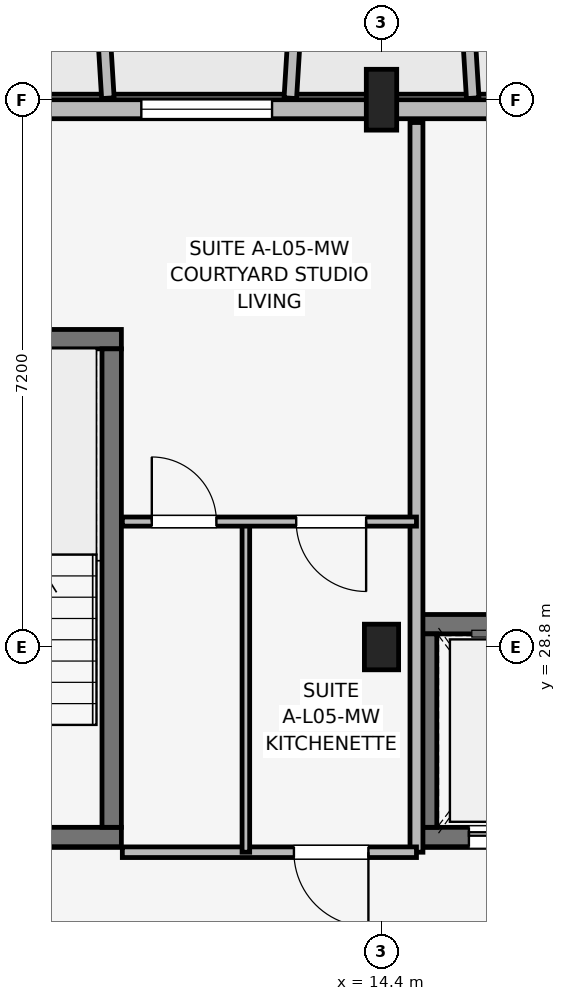
"""IFC4 building model, lengths in metres.
Left out: names, types, materials, properties, quantities, classifications, styles, units other than length and angle.
Written with IfcOpenShell. Run it as: python <this file> out.ifc"""

import sys

from ifc_helpers import new_model, si_unit, direction, frame, frame_2d, origin, origin_2d, place, context, subcontext, project, spatial, rectangle, extrude, element, fill, save


model = new_model("IFC4")
c1 = context("Model", 3, precision=1e-05, world=origin(), true_north=direction((0.0, 1.0)))
c2 = subcontext(c1, "Body", "Model", "MODEL_VIEW")
j1 = project(units=[si_unit("LENGTHUNIT", "METRE"), si_unit("PLANEANGLEUNIT", "RADIAN")], contexts=[c1])
p1 = place(None, origin())
s1 = spatial("IfcSite", under=j1, at=p1, CompositionType="ELEMENT")
p2 = place(p1, origin())
s2 = spatial("IfcBuilding", under=s1, at=p2, CompositionType="ELEMENT")
p3 = place(p2, frame((0.0, 0.0, 18.15)))
s3 = spatial("IfcBuildingStorey", under=s2, at=p3, CompositionType="ELEMENT", Elevation=18.15)
p4 = place(p3, frame((14.4, 28.8, 0.0), z_axis=(0.0, 0.0, 1.0), x_axis=(1.0, 0.0, 0.0)))
e1 = element("IfcColumn", 1, at=p4, inside=s3, PredefinedType="COLUMN", context=c2, shape_type="SweptSolid", body=[
    extrude(rectangle(XDim=0.45, YDim=0.6, at=origin_2d()), origin(), (0.0, 0.0, 1.0), 3.15),
])
p5 = place(p3, frame((14.4, 36.0, 0.0), z_axis=(0.0, 0.0, 1.0), x_axis=(1.0, 0.0, 0.0)))
e2 = element("IfcColumn", 2, at=p5, inside=s3, PredefinedType="COLUMN", context=c2, shape_type="SweptSolid", body=[
    extrude(rectangle(XDim=0.4, YDim=0.8, at=origin_2d()), origin(), (0.0, 0.0, 1.0), 3.15),
])
p6 = place(p3, frame((7.673, 26.3, 0.0), z_axis=(0.0, 0.0, 1.0), x_axis=(1.0, 0.0, 0.0)))
e3 = element("IfcWall", 3, at=p6, inside=s3, PredefinedType="SHEAR", context=c2, shape_type="SweptSolid", body=[
    extrude(rectangle(XDim=3.305, YDim=0.255, at=frame_2d((1.652, 0.0))), origin(), (0.0, 0.0, 1.0), 3.15),
])
p7 = place(p6, frame((2.177, 0.0, 0.0), z_axis=(0.0, 0.0, 1.0), x_axis=(-1.0, 0.0, 0.0)))
e4 = element("IfcOpeningElement", 4, at=p7, cuts=e3, PredefinedType="OPENING", context=c2, shape_type="SweptSolid", body=[
    extrude(rectangle(XDim=1.05, YDim=2.12, at=frame_2d((0.525, 1.06))), frame((0.0, 0.137, 0.0), z_axis=(0.0, -1.0, 0.0), x_axis=(1.0, 0.0, 0.0)), (0.0, 0.0, 1.0), 0.275),
])
p8 = place(p3, frame((7.673, 32.85, 0.0), z_axis=(0.0, 0.0, 1.0), x_axis=(1.0, 0.0, 0.0)))
e5 = element("IfcWall", 5, at=p8, inside=s3, PredefinedType="SHEAR", context=c2, shape_type="SweptSolid", body=[
    extrude(rectangle(XDim=3.305, YDim=0.255, at=frame_2d((1.652, 0.0))), origin(), (0.0, 0.0, 1.0), 3.15),
])
p9 = place(p3, frame((10.85, 26.427, 0.0), z_axis=(0.0, 0.0, 1.0), x_axis=(0.0, 1.0, 0.0)))
e6 = element("IfcWall", 6, at=p9, inside=s3, PredefinedType="SHEAR", context=c2, shape_type="SweptSolid", body=[
    extrude(rectangle(XDim=6.295, YDim=0.255, at=frame_2d((3.147, 0.0))), origin(), (0.0, 0.0, 1.0), 3.15),
])
p10 = place(p3, frame((14.873, 26.3, 0.0), z_axis=(0.0, 0.0, 1.0), x_axis=(1.0, 0.0, 0.0)))
e7 = element("IfcWall", 7, at=p10, inside=s3, PredefinedType="SHEAR", context=c2, shape_type="SweptSolid", body=[
    extrude(rectangle(XDim=2.455, YDim=0.255, at=frame_2d((1.228, 0.0))), origin(), (0.0, 0.0, 1.0), 3.15),
])
p11 = place(p10, frame((0.677, 0.0, 0.0)))
e8 = element("IfcOpeningElement", 8, at=p11, cuts=e7, PredefinedType="OPENING", context=c2, shape_type="SweptSolid", body=[
    extrude(rectangle(XDim=1.1, YDim=2.15, at=frame_2d((0.55, 1.075))), frame((0.0, 0.137, 0.0), z_axis=(0.0, -1.0, 0.0), x_axis=(1.0, 0.0, 0.0)), (0.0, 0.0, 1.0), 0.275),
])
p12 = place(p3, frame((14.873, 29.1, 0.0), z_axis=(0.0, 0.0, 1.0), x_axis=(1.0, 0.0, 0.0)))
e9 = element("IfcWall", 9, at=p12, inside=s3, PredefinedType="SHEAR", context=c2, shape_type="SweptSolid", body=[
    extrude(rectangle(XDim=2.455, YDim=0.255, at=frame_2d((1.228, 0.0))), origin(), (0.0, 0.0, 1.0), 3.15),
])
p13 = place(p3, frame((15.0, 26.427, 0.0), z_axis=(0.0, 0.0, 1.0), x_axis=(0.0, 1.0, 0.0)))
e10 = element("IfcWall", 10, at=p13, inside=s3, PredefinedType="SHEAR", context=c2, shape_type="SweptSolid", body=[
    extrude(rectangle(XDim=2.545, YDim=0.255, at=frame_2d((1.272, 0.0))), origin(), (0.0, 0.0, 1.0), 3.15),
])
p14 = place(p3, frame((32.6, 35.875, 0.0), z_axis=(0.0, 0.0, 1.0), x_axis=(-1.0, 0.0, 0.0)))
e11 = element("IfcWall", 11, at=p14, inside=s3, PredefinedType="SOLIDWALL", context=c2, shape_type="SweptSolid", body=[
    extrude(rectangle(XDim=29.2, YDim=0.25, at=frame_2d((14.6, 0.0))), origin(), (0.0, 0.0, 1.0), 2.43),
])
p15 = place(p14, frame((28.55, 0.0, 0.0), z_axis=(0.0, 0.0, 1.0), x_axis=(-1.0, 0.0, 0.0)))
e12 = element("IfcOpeningElement", 12, at=p15, cuts=e11, PredefinedType="OPENING", context=c2, shape_type="SweptSolid", body=[
    extrude(rectangle(XDim=1.5, YDim=2.15, at=frame_2d((0.75, 1.075))), frame((0.0, 0.135, 0.0), z_axis=(0.0, -1.0, 0.0), x_axis=(1.0, 0.0, 0.0)), (0.0, 0.0, 1.0), 0.27),
])
p16 = place(p14, frame((2.225, 0.0, 0.0), z_axis=(0.0, 0.0, 1.0), x_axis=(-1.0, 0.0, 0.0)))
e13 = element("IfcOpeningElement", 13, at=p16, cuts=e11, PredefinedType="OPENING", context=c2, shape_type="SweptSolid", body=[
    extrude(rectangle(XDim=1.65, YDim=2.15, at=frame_2d((0.825, 1.075))), frame((0.0, 0.135, 0.0), z_axis=(0.0, -1.0, 0.0), x_axis=(1.0, 0.0, 0.0)), (0.0, 0.0, 1.0), 0.27),
])
p17 = place(p14, frame((14.83, 0.0, 0.5)))
e14 = element("IfcOpeningElement", 14, at=p17, cuts=e11, PredefinedType="OPENING", context=c2, shape_type="SweptSolid", body=[
    extrude(rectangle(XDim=1.15, YDim=1.68, at=frame_2d((0.575, 0.84))), frame((0.0, 0.135, 0.0), z_axis=(0.0, -1.0, 0.0), x_axis=(1.0, 0.0, 0.0)), (0.0, 0.0, 1.0), 0.27),
])
p18 = place(p14, frame((7.885, 0.0, 0.7)))
e15 = element("IfcOpeningElement", 15, at=p18, cuts=e11, PredefinedType="OPENING", context=c2, shape_type="SweptSolid", body=[
    extrude(rectangle(XDim=1.58, YDim=1.6, at=frame_2d((0.79, 0.8))), frame((0.0, 0.135, 0.0), z_axis=(0.0, -1.0, 0.0), x_axis=(1.0, 0.0, 0.0)), (0.0, 0.0, 1.0), 0.27),
])
p19 = place(p14, frame((19.64, 0.0, 0.7)))
e16 = element("IfcOpeningElement", 16, at=p19, cuts=e11, PredefinedType="OPENING", context=c2, shape_type="SweptSolid", body=[
    extrude(rectangle(XDim=1.72, YDim=1.6, at=frame_2d((0.86, 0.8))), frame((0.0, 0.135, 0.0), z_axis=(0.0, -1.0, 0.0), x_axis=(1.0, 0.0, 0.0)), (0.0, 0.0, 1.0), 0.27),
])
for number, where, z_axis, x_axis in (
    (17, (10.8, 36.02, 0.0), (0.0, 0.0, 1.0), (-0.061, 0.998, 0.0)),
    (18, (13.2, 36.02, 0.0), (0.0, 0.0, 1.0), (0.061, 0.998, 0.0)),
):
    element("IfcWall", number, at=place(p3, frame(where, z_axis=z_axis, x_axis=x_axis)), inside=s3, PredefinedType="ELEMENTEDWALL", context=c2, shape_type="SweptSolid", body=[
        extrude(rectangle(XDim=1.964, YDim=0.165, at=frame_2d((0.982, 0.0))), origin(), (0.0, 0.0, 1.0), 2.53),
    ])
p20 = place(p3, frame((15.6, 36.02, 0.0), z_axis=(0.0, 0.0, 1.0), x_axis=(-0.061170732449, 0.998127317276, 0.0)))
e19 = element("IfcWall", 19, at=p20, inside=s3, PredefinedType="ELEMENTEDWALL", context=c2, shape_type="SweptSolid", body=[
    extrude(rectangle(XDim=1.964, YDim=0.165, at=frame_2d((0.982, 0.0))), origin(), (0.0, 0.0, 1.0), 2.48),
])
p21 = place(p3, frame((14.86, 26.1, 0.0), z_axis=(0.0, 0.0, 1.0), x_axis=(0.0, 1.0, 0.0)))
e20 = element("IfcWall", 20, at=p21, inside=s3, PredefinedType="PARTITIONING", context=c2, shape_type="SweptSolid", body=[
    extrude(rectangle(XDim=9.6, YDim=0.17, at=frame_2d((4.8, 0.0))), origin(), (0.0, 0.0, 1.0), 2.38),
])
p22 = place(p3, frame((10.99, 26.1, 0.0), z_axis=(0.0, 0.0, 1.0), x_axis=(1.0, 0.0, 0.0)))
e21 = element("IfcWall", 21, at=p22, inside=s3, PredefinedType="PARTITIONING", context=c2, shape_type="SweptSolid", body=[
    extrude(rectangle(XDim=3.87, YDim=0.14, at=frame_2d((1.935, 0.0))), origin(), (0.0, 0.0, 1.0), 2.38),
])
p23 = place(p22, frame((3.238, 0.0, 0.0), z_axis=(0.0, 0.0, 1.0), x_axis=(-1.0, 0.0, 0.0)))
e22 = element("IfcOpeningElement", 22, at=p23, cuts=e21, PredefinedType="OPENING", context=c2, shape_type="SweptSolid", body=[
    extrude(rectangle(XDim=0.98, YDim=2.1, at=frame_2d((0.49, 1.05))), frame((0.0, 0.08, 0.0), z_axis=(0.0, -1.0, 0.0), x_axis=(1.0, 0.0, 0.0)), (0.0, 0.0, 1.0), 0.16),
])
p24 = place(p3, frame((12.615, 26.1, 0.0), z_axis=(0.0, 0.0, 1.0), x_axis=(0.0, 1.0, 0.0)))
e23 = element("IfcWall", 23, at=p24, inside=s3, PredefinedType="PARTITIONING", context=c2, shape_type="SweptSolid", body=[
    extrude(rectangle(XDim=4.35, YDim=0.1, at=frame_2d((2.175, 0.0))), origin(), (0.0, 0.0, 1.0), 2.375),
])
p25 = place(p3, frame((10.99, 30.45, 0.0), z_axis=(0.0, 0.0, 1.0), x_axis=(1.0, 0.0, 0.0)))
e24 = element("IfcWall", 24, at=p25, inside=s3, PredefinedType="PARTITIONING", context=c2, shape_type="SweptSolid", body=[
    extrude(rectangle(XDim=3.87, YDim=0.12, at=frame_2d((1.935, 0.0))), origin(), (0.0, 0.0, 1.0), 2.38),
])
p26 = place(p25, frame((0.388, 0.0, 0.0)))
e25 = element("IfcOpeningElement", 25, at=p26, cuts=e24, PredefinedType="OPENING", context=c2, shape_type="SweptSolid", body=[
    extrude(rectangle(XDim=0.85, YDim=2.08, at=frame_2d((0.425, 1.04))), frame((0.0, 0.07, 0.0), z_axis=(0.0, -1.0, 0.0), x_axis=(1.0, 0.0, 0.0)), (0.0, 0.0, 1.0), 0.14),
])
p27 = place(p25, frame((3.208, 0.0, 0.0), z_axis=(0.0, 0.0, 1.0), x_axis=(-1.0, 0.0, 0.0)))
e26 = element("IfcOpeningElement", 26, at=p27, cuts=e24, PredefinedType="OPENING", context=c2, shape_type="SweptSolid", body=[
    extrude(rectangle(XDim=0.92, YDim=2.08, at=frame_2d((0.46, 1.04))), frame((0.0, 0.07, 0.0), z_axis=(0.0, -1.0, 0.0), x_axis=(1.0, 0.0, 0.0)), (0.0, 0.0, 1.0), 0.14),
])
p28 = place(p19, origin())
e27 = element("IfcWindow", 27, at=p28, inside=s3, PartitioningType="SINGLE_PANEL", PredefinedType="WINDOW", context=c2, shape_type="SweptSolid", body=[
    extrude(rectangle(XDim=1.72, YDim=1.6, at=frame_2d((0.86, 0.8))), frame((0.0, 0.03, 0.0), z_axis=(0.0, -1.0, 0.0), x_axis=(1.0, 0.0, 0.0)), (0.0, 0.0, 1.0), 0.06),
])
fill(e16, e27)
p29 = place(p23, origin())
e28 = element("IfcDoor", 28, at=p29, inside=s3, OperationType="SINGLE_SWING_RIGHT", PredefinedType="DOOR", context=c2, shape_type="SweptSolid", body=[
    extrude(rectangle(XDim=0.98, YDim=2.1, at=frame_2d((0.49, 1.05))), frame((0.0, 0.025, 0.0), z_axis=(0.0, -1.0, 0.0), x_axis=(1.0, 0.0, 0.0)), (0.0, 0.0, 1.0), 0.05),
])
fill(e22, e28)
p30 = place(p26, origin())
e29 = element("IfcDoor", 29, at=p30, inside=s3, OperationType="SINGLE_SWING_LEFT", PredefinedType="DOOR", context=c2, shape_type="SweptSolid", body=[
    extrude(rectangle(XDim=0.85, YDim=2.08, at=frame_2d((0.425, 1.04))), frame((0.0, 0.025, 0.0), z_axis=(0.0, -1.0, 0.0), x_axis=(1.0, 0.0, 0.0)), (0.0, 0.0, 1.0), 0.05),
])
fill(e25, e29)
p31 = place(p27, origin())
e30 = element("IfcDoor", 30, at=p31, inside=s3, OperationType="SINGLE_SWING_RIGHT", PredefinedType="DOOR", context=c2, shape_type="SweptSolid", body=[
    extrude(rectangle(XDim=0.92, YDim=2.08, at=frame_2d((0.46, 1.04))), frame((0.0, 0.025, 0.0), z_axis=(0.0, -1.0, 0.0), x_axis=(1.0, 0.0, 0.0)), (0.0, 0.0, 1.0), 0.05),
])
fill(e26, e30)
p32 = place(p11, origin())
e31 = element("IfcDoor", 31, at=p32, inside=s3, OperationType="SLIDING_TO_LEFT", PredefinedType="DOOR", context=c2, shape_type="SweptSolid", body=[
    extrude(rectangle(XDim=1.1, YDim=2.15, at=frame_2d((0.55, 1.075))), frame((0.0, 0.025, 0.0), z_axis=(0.0, -1.0, 0.0), x_axis=(1.0, 0.0, 0.0)), (0.0, 0.0, 1.0), 0.05),
])
fill(e8, e31)
save(model, sys.argv[1])
